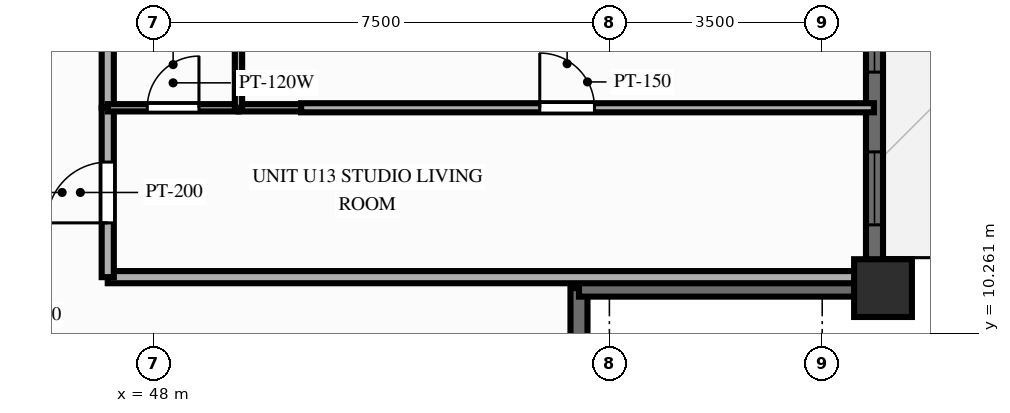
"""IFC4 building model, lengths in metres.
Left out: names, types, materials, properties, quantities, classifications, styles, units other than length and angle.
Written with IfcOpenShell. Run it as: python <this file> out.ifc"""

import sys

from ifc_helpers import new_model, si_unit, direction, frame, frame_2d, origin, origin_2d, place, context, subcontext, project, spatial, rectangle, extrude, source, transform, mapped, element, fill, save


model = new_model("IFC4")
c1 = context("Model", 3, precision=1e-05, world=origin(), true_north=direction((0.0, 1.0)))
c2 = subcontext(c1, "Body", "Model", "MODEL_VIEW")
j1 = project(units=[si_unit("LENGTHUNIT", "METRE"), si_unit("PLANEANGLEUNIT", "RADIAN")], contexts=[c1])
p1 = place(None, origin())
s1 = spatial("IfcSite", under=j1, at=p1, CompositionType="ELEMENT")
p2 = place(p1, origin())
s2 = spatial("IfcBuilding", under=s1, at=p2, CompositionType="ELEMENT")
p3 = place(p2, frame((0.0, 0.0, 163.0)))
s3 = spatial("IfcBuildingStorey", under=s2, at=p3, CompositionType="ELEMENT", Elevation=163.0)
m1 = source(origin(), c2, "Body", "SweptSolid", [
    extrude(rectangle(XDim=0.95, YDim=0.95, at=origin_2d()), origin(), (0.0, 0.0, 1.0), 3.0),
])
p4 = place(p3, frame((60.0, 11.0, 0.0), z_axis=(0.0, 0.0, 1.0), x_axis=(1.0, 0.0, 0.0)))
e1 = element("IfcColumn", 1, at=p4, inside=s3, PredefinedType="COLUMN", context=c2, shape_type="MappedRepresentation", body=[
    mapped(m1, transform((0.0, 0.0, 0.0), scale=1.0)),
])
p5 = place(p3, frame((59.86, 11.0, 0.0), z_axis=(0.0, 0.0, 1.0), x_axis=(0.0, 1.0, 0.0)))
e2 = element("IfcWall", 2, at=p5, inside=s3, PredefinedType="SOLIDWALL", context=c2, shape_type="SweptSolid", body=[
    extrude(rectangle(XDim=32.0, YDim=0.28, at=frame_2d((16.0, 0.0))), origin(), (0.0, 0.0, 1.0), 2.28),
])
p6 = place(p5, frame((1.04, 0.0, 0.25)))
e3 = element("IfcOpeningElement", 3, at=p6, cuts=e2, PredefinedType="OPENING", context=c2, shape_type="SweptSolid", body=[
    extrude(rectangle(XDim=1.2, YDim=1.5, at=frame_2d((0.6, 0.75))), frame((0.0, 0.152, 0.0), z_axis=(0.0, -1.0, 0.0), x_axis=(1.0, 0.0, 0.0)), (0.0, 0.0, 1.0), 0.304),
])
p7 = place(p5, frame((3.552, 0.0, 0.25)))
e4 = element("IfcOpeningElement", 4, at=p7, cuts=e2, PredefinedType="OPENING", context=c2, shape_type="SweptSolid", body=[
    extrude(rectangle(XDim=1.2, YDim=1.5, at=frame_2d((0.6, 0.75))), frame((0.0, 0.152, 0.0), z_axis=(0.0, -1.0, 0.0), x_axis=(1.0, 0.0, 0.0)), (0.0, 0.0, 1.0), 0.304),
])
p8 = place(p5, frame((5.662, 0.0, 0.25)))
e5 = element("IfcOpeningElement", 5, at=p8, cuts=e2, PredefinedType="OPENING", context=c2, shape_type="SweptSolid", body=[
    extrude(rectangle(XDim=0.7, YDim=1.5, at=frame_2d((0.35, 0.75))), frame((0.0, 0.152, 0.0), z_axis=(0.0, -1.0, 0.0), x_axis=(1.0, 0.0, 0.0)), (0.0, 0.0, 1.0), 0.304),
])
p9 = place(p5, frame((8.29, 0.0, 0.25)))
e6 = element("IfcOpeningElement", 6, at=p9, cuts=e2, PredefinedType="OPENING", context=c2, shape_type="SweptSolid", body=[
    extrude(rectangle(XDim=1.2, YDim=1.5, at=frame_2d((0.6, 0.75))), frame((0.0, 0.152, 0.0), z_axis=(0.0, -1.0, 0.0), x_axis=(1.0, 0.0, 0.0)), (0.0, 0.0, 1.0), 0.304),
])
p10 = place(p5, frame((10.688, 0.0, 0.25)))
e7 = element("IfcOpeningElement", 7, at=p10, cuts=e2, PredefinedType="OPENING", context=c2, shape_type="SweptSolid", body=[
    extrude(rectangle(XDim=1.2, YDim=1.5, at=frame_2d((0.6, 0.75))), frame((0.0, 0.152, 0.0), z_axis=(0.0, -1.0, 0.0), x_axis=(1.0, 0.0, 0.0)), (0.0, 0.0, 1.0), 0.304),
])
p11 = place(p5, frame((13.046, 0.0, 0.25)))
e8 = element("IfcOpeningElement", 8, at=p11, cuts=e2, PredefinedType="OPENING", context=c2, shape_type="SweptSolid", body=[
    extrude(rectangle(XDim=1.2, YDim=1.5, at=frame_2d((0.6, 0.75))), frame((0.0, 0.152, 0.0), z_axis=(0.0, -1.0, 0.0), x_axis=(1.0, 0.0, 0.0)), (0.0, 0.0, 1.0), 0.304),
])
p12 = place(p5, frame((15.4, 0.0, 0.25)))
e9 = element("IfcOpeningElement", 9, at=p12, cuts=e2, PredefinedType="OPENING", context=c2, shape_type="SweptSolid", body=[
    extrude(rectangle(XDim=1.2, YDim=1.5, at=frame_2d((0.6, 0.75))), frame((0.0, 0.152, 0.0), z_axis=(0.0, -1.0, 0.0), x_axis=(1.0, 0.0, 0.0)), (0.0, 0.0, 1.0), 0.304),
])
p13 = place(p5, frame((19.233, 0.0, 0.0), z_axis=(0.0, 0.0, 1.0), x_axis=(-1.0, 0.0, 0.0)))
e10 = element("IfcOpeningElement", 10, at=p13, cuts=e2, PredefinedType="OPENING", context=c2, shape_type="SweptSolid", body=[
    extrude(rectangle(XDim=1.6, YDim=2.15, at=frame_2d((0.8, 1.075))), frame((0.0, 0.152, 0.0), z_axis=(0.0, -1.0, 0.0), x_axis=(1.0, 0.0, 0.0)), (0.0, 0.0, 1.0), 0.304),
])
p14 = place(p5, frame((20.339, 0.0, 0.25)))
e11 = element("IfcOpeningElement", 11, at=p14, cuts=e2, PredefinedType="OPENING", context=c2, shape_type="SweptSolid", body=[
    extrude(rectangle(XDim=1.2, YDim=1.5, at=frame_2d((0.6, 0.75))), frame((0.0, 0.152, 0.0), z_axis=(0.0, -1.0, 0.0), x_axis=(1.0, 0.0, 0.0)), (0.0, 0.0, 1.0), 0.304),
])
p15 = place(p5, frame((22.788, 0.0, 0.25)))
e12 = element("IfcOpeningElement", 12, at=p15, cuts=e2, PredefinedType="OPENING", context=c2, shape_type="SweptSolid", body=[
    extrude(rectangle(XDim=1.2, YDim=1.5, at=frame_2d((0.6, 0.75))), frame((0.0, 0.152, 0.0), z_axis=(0.0, -1.0, 0.0), x_axis=(1.0, 0.0, 0.0)), (0.0, 0.0, 1.0), 0.304),
])
p16 = place(p5, frame((25.66, 0.0, 0.25)))
e13 = element("IfcOpeningElement", 13, at=p16, cuts=e2, PredefinedType="OPENING", context=c2, shape_type="SweptSolid", body=[
    extrude(rectangle(XDim=0.95, YDim=1.5, at=frame_2d((0.475, 0.75))), frame((0.0, 0.152, 0.0), z_axis=(0.0, -1.0, 0.0), x_axis=(1.0, 0.0, 0.0)), (0.0, 0.0, 1.0), 0.304),
])
p17 = place(p5, frame((27.475, 0.0, 0.25)))
e14 = element("IfcOpeningElement", 14, at=p17, cuts=e2, PredefinedType="OPENING", context=c2, shape_type="SweptSolid", body=[
    extrude(rectangle(XDim=1.2, YDim=1.5, at=frame_2d((0.6, 0.75))), frame((0.0, 0.152, 0.0), z_axis=(0.0, -1.0, 0.0), x_axis=(1.0, 0.0, 0.0)), (0.0, 0.0, 1.0), 0.304),
])
p18 = place(p5, frame((29.839, 0.0, 0.25)))
e15 = element("IfcOpeningElement", 15, at=p18, cuts=e2, PredefinedType="OPENING", context=c2, shape_type="SweptSolid", body=[
    extrude(rectangle(XDim=1.2, YDim=1.5, at=frame_2d((0.6, 0.75))), frame((0.0, 0.152, 0.0), z_axis=(0.0, -1.0, 0.0), x_axis=(1.0, 0.0, 0.0)), (0.0, 0.0, 1.0), 0.304),
])
for number, where, z_axis, x_axis in (
    (16, (55.0, 6.08, 0.0), (0.0, 0.0, 1.0), (0.0, 1.0, 0.0)),
    (17, (55.0, 11.0, 0.0), (0.0, 0.0, 1.0), (1.0, 0.0, 0.0)),
):
    element("IfcWall", number, at=place(p3, frame(where, z_axis=z_axis, x_axis=x_axis)), inside=s3, PredefinedType="SOLIDWALL", context=c2, shape_type="SweptSolid", body=[
        extrude(rectangle(XDim=4.92, YDim=0.28, at=frame_2d((2.46, 0.0))), origin(), (0.0, 0.0, 1.0), 2.28),
    ])
p19 = place(p3, frame((47.25, 11.18, 0.0), z_axis=(0.0, 0.0, 1.0), x_axis=(1.0, 0.0, 0.0)))
e18 = element("IfcWall", 18, at=p19, inside=s3, PredefinedType="PARTITIONING", context=c2, shape_type="SweptSolid", body=[
    extrude(rectangle(XDim=12.6, YDim=0.2, at=frame_2d((6.3, 0.0))), origin(), (0.0, 0.0, 1.0), 2.79),
])
p20 = place(p3, frame((47.25, 11.18, 0.0), z_axis=(0.0, 0.0, 1.0), x_axis=(0.0, 1.0, 0.0)))
e19 = element("IfcWall", 19, at=p20, inside=s3, PredefinedType="PARTITIONING", context=c2, shape_type="SweptSolid", body=[
    extrude(rectangle(XDim=2.786, YDim=0.2, at=frame_2d((1.393, 0.0))), origin(), (0.0, 0.0, 1.0), 2.79),
])
p21 = place(p20, frame((0.893, 0.0, 0.0)))
e20 = element("IfcOpeningElement", 20, at=p21, cuts=e19, PredefinedType="OPENING", context=c2, shape_type="SweptSolid", body=[
    extrude(rectangle(XDim=1.0, YDim=2.15, at=frame_2d((0.5, 1.075))), frame((0.0, 0.112, 0.0), z_axis=(0.0, -1.0, 0.0), x_axis=(1.0, 0.0, 0.0)), (0.0, 0.0, 1.0), 0.224),
])
p22 = place(p3, frame((47.25, 13.966, 0.0), z_axis=(0.0, 0.0, 1.0), x_axis=(0.0, 1.0, 0.0)))
e21 = element("IfcWall", 21, at=p22, inside=s3, PredefinedType="PARTITIONING", context=c2, shape_type="SweptSolid", body=[
    extrude(rectangle(XDim=2.373, YDim=0.2, at=frame_2d((1.187, 0.0))), origin(), (0.0, 0.0, 1.0), 2.79),
])
p23 = place(p3, frame((47.25, 13.966, 0.0), z_axis=(0.0, 0.0, 1.0), x_axis=(1.0, 0.0, 0.0)))
e22 = element("IfcWall", 22, at=p23, inside=s3, PredefinedType="PARTITIONING", context=c2, shape_type="SweptSolid", body=[
    extrude(rectangle(XDim=2.15, YDim=0.12, at=frame_2d((1.075, 0.0))), origin(), (0.0, 0.0, 1.0), 2.79),
])
p24 = place(p23, frame((0.65, 0.0, 0.0)))
e23 = element("IfcOpeningElement", 23, at=p24, cuts=e22, PredefinedType="OPENING", context=c2, shape_type="SweptSolid", body=[
    extrude(rectangle(XDim=0.85, YDim=2.05, at=frame_2d((0.425, 1.025))), frame((0.0, 0.072, 0.0), z_axis=(0.0, -1.0, 0.0), x_axis=(1.0, 0.0, 0.0)), (0.0, 0.0, 1.0), 0.144),
])
p25 = place(p3, frame((49.4, 13.966, 0.0), z_axis=(0.0, 0.0, 1.0), x_axis=(1.0, 0.0, 0.0)))
e24 = element("IfcWall", 24, at=p25, inside=s3, PredefinedType="PARTITIONING", context=c2, shape_type="SweptSolid", body=[
    extrude(rectangle(XDim=1.03, YDim=0.12, at=frame_2d((0.515, 0.0))), origin(), (0.0, 0.0, 1.0), 2.79),
])
p26 = place(p3, frame((49.4, 13.966, 0.0), z_axis=(0.0, 0.0, 1.0), x_axis=(0.0, 1.0, 0.0)))
e25 = element("IfcWall", 25, at=p26, inside=s3, PredefinedType="PARTITIONING", context=c2, shape_type="SweptSolid", body=[
    extrude(rectangle(XDim=2.373, YDim=0.12, at=frame_2d((1.187, 0.0))), origin(), (0.0, 0.0, 1.0), 2.79),
])
p27 = place(p3, frame((50.43, 13.966, 0.0), z_axis=(0.0, 0.0, 1.0), x_axis=(1.0, 0.0, 0.0)))
e26 = element("IfcWall", 26, at=p27, inside=s3, PredefinedType="PARTITIONING", context=c2, shape_type="SweptSolid", body=[
    extrude(rectangle(XDim=9.42, YDim=0.15, at=frame_2d((4.71, 0.0))), origin(), (0.0, 0.0, 1.0), 2.79),
])
p28 = place(p27, frame((3.925, 0.0, 0.0)))
e27 = element("IfcOpeningElement", 27, at=p28, cuts=e26, PredefinedType="OPENING", context=c2, shape_type="SweptSolid", body=[
    extrude(rectangle(XDim=0.9, YDim=2.1, at=frame_2d((0.45, 1.05))), frame((0.0, 0.087, 0.0), z_axis=(0.0, -1.0, 0.0), x_axis=(1.0, 0.0, 0.0)), (0.0, 0.0, 1.0), 0.174),
])
m2 = source(origin(), c2, "Body", "SweptSolid", [
    extrude(rectangle(XDim=1.2, YDim=1.5, at=frame_2d((0.6, 0.75))), frame((0.0, 0.03, 0.0), z_axis=(0.0, -1.0, 0.0), x_axis=(1.0, 0.0, 0.0)), (0.0, 0.0, 1.0), 0.06),
])
p29 = place(p6, origin())
e28 = element("IfcWindow", 28, at=p29, inside=s3, PartitioningType="SINGLE_PANEL", PredefinedType="WINDOW", context=c2, shape_type="MappedRepresentation", body=[
    mapped(m2, transform((0.0, 0.0, 0.0), scale=1.0)),
])
fill(e3, e28)
p30 = place(p7, origin())
e29 = element("IfcWindow", 29, at=p30, inside=s3, PartitioningType="SINGLE_PANEL", PredefinedType="WINDOW", context=c2, shape_type="MappedRepresentation", body=[
    mapped(m2, transform((0.0, 0.0, 0.0), scale=1.0)),
])
fill(e4, e29)
m3 = source(origin(), c2, "Body", "SweptSolid", [
    extrude(rectangle(XDim=1.0, YDim=2.15, at=frame_2d((0.5, 1.075))), frame((0.0, 0.025, 0.0), z_axis=(0.0, -1.0, 0.0), x_axis=(1.0, 0.0, 0.0)), (0.0, 0.0, 1.0), 0.05),
])
p31 = place(p21, origin())
e30 = element("IfcDoor", 30, at=p31, inside=s3, OperationType="SINGLE_SWING_LEFT", PredefinedType="DOOR", context=c2, shape_type="MappedRepresentation", body=[
    mapped(m3, transform((0.0, 0.0, 0.0), scale=1.0)),
])
fill(e20, e30)
m4 = source(origin(), c2, "Body", "SweptSolid", [
    extrude(rectangle(XDim=0.85, YDim=2.05, at=frame_2d((0.425, 1.025))), frame((0.0, 0.025, 0.0), z_axis=(0.0, -1.0, 0.0), x_axis=(1.0, 0.0, 0.0)), (0.0, 0.0, 1.0), 0.05),
])
p32 = place(p24, origin())
e31 = element("IfcDoor", 31, at=p32, inside=s3, OperationType="SINGLE_SWING_RIGHT", PredefinedType="DOOR", context=c2, shape_type="MappedRepresentation", body=[
    mapped(m4, transform((0.0, 0.0, 0.0), scale=1.0)),
])
fill(e23, e31)
m5 = source(origin(), c2, "Body", "SweptSolid", [
    extrude(rectangle(XDim=0.9, YDim=2.1, at=frame_2d((0.45, 1.05))), frame((0.0, 0.025, 0.0), z_axis=(0.0, -1.0, 0.0), x_axis=(1.0, 0.0, 0.0)), (0.0, 0.0, 1.0), 0.05),
])
p33 = place(p28, origin())
e32 = element("IfcDoor", 32, at=p33, inside=s3, OperationType="SINGLE_SWING_LEFT", PredefinedType="DOOR", context=c2, shape_type="MappedRepresentation", body=[
    mapped(m5, transform((0.0, 0.0, 0.0), scale=1.0)),
])
fill(e27, e32)
save(model, sys.argv[1])
